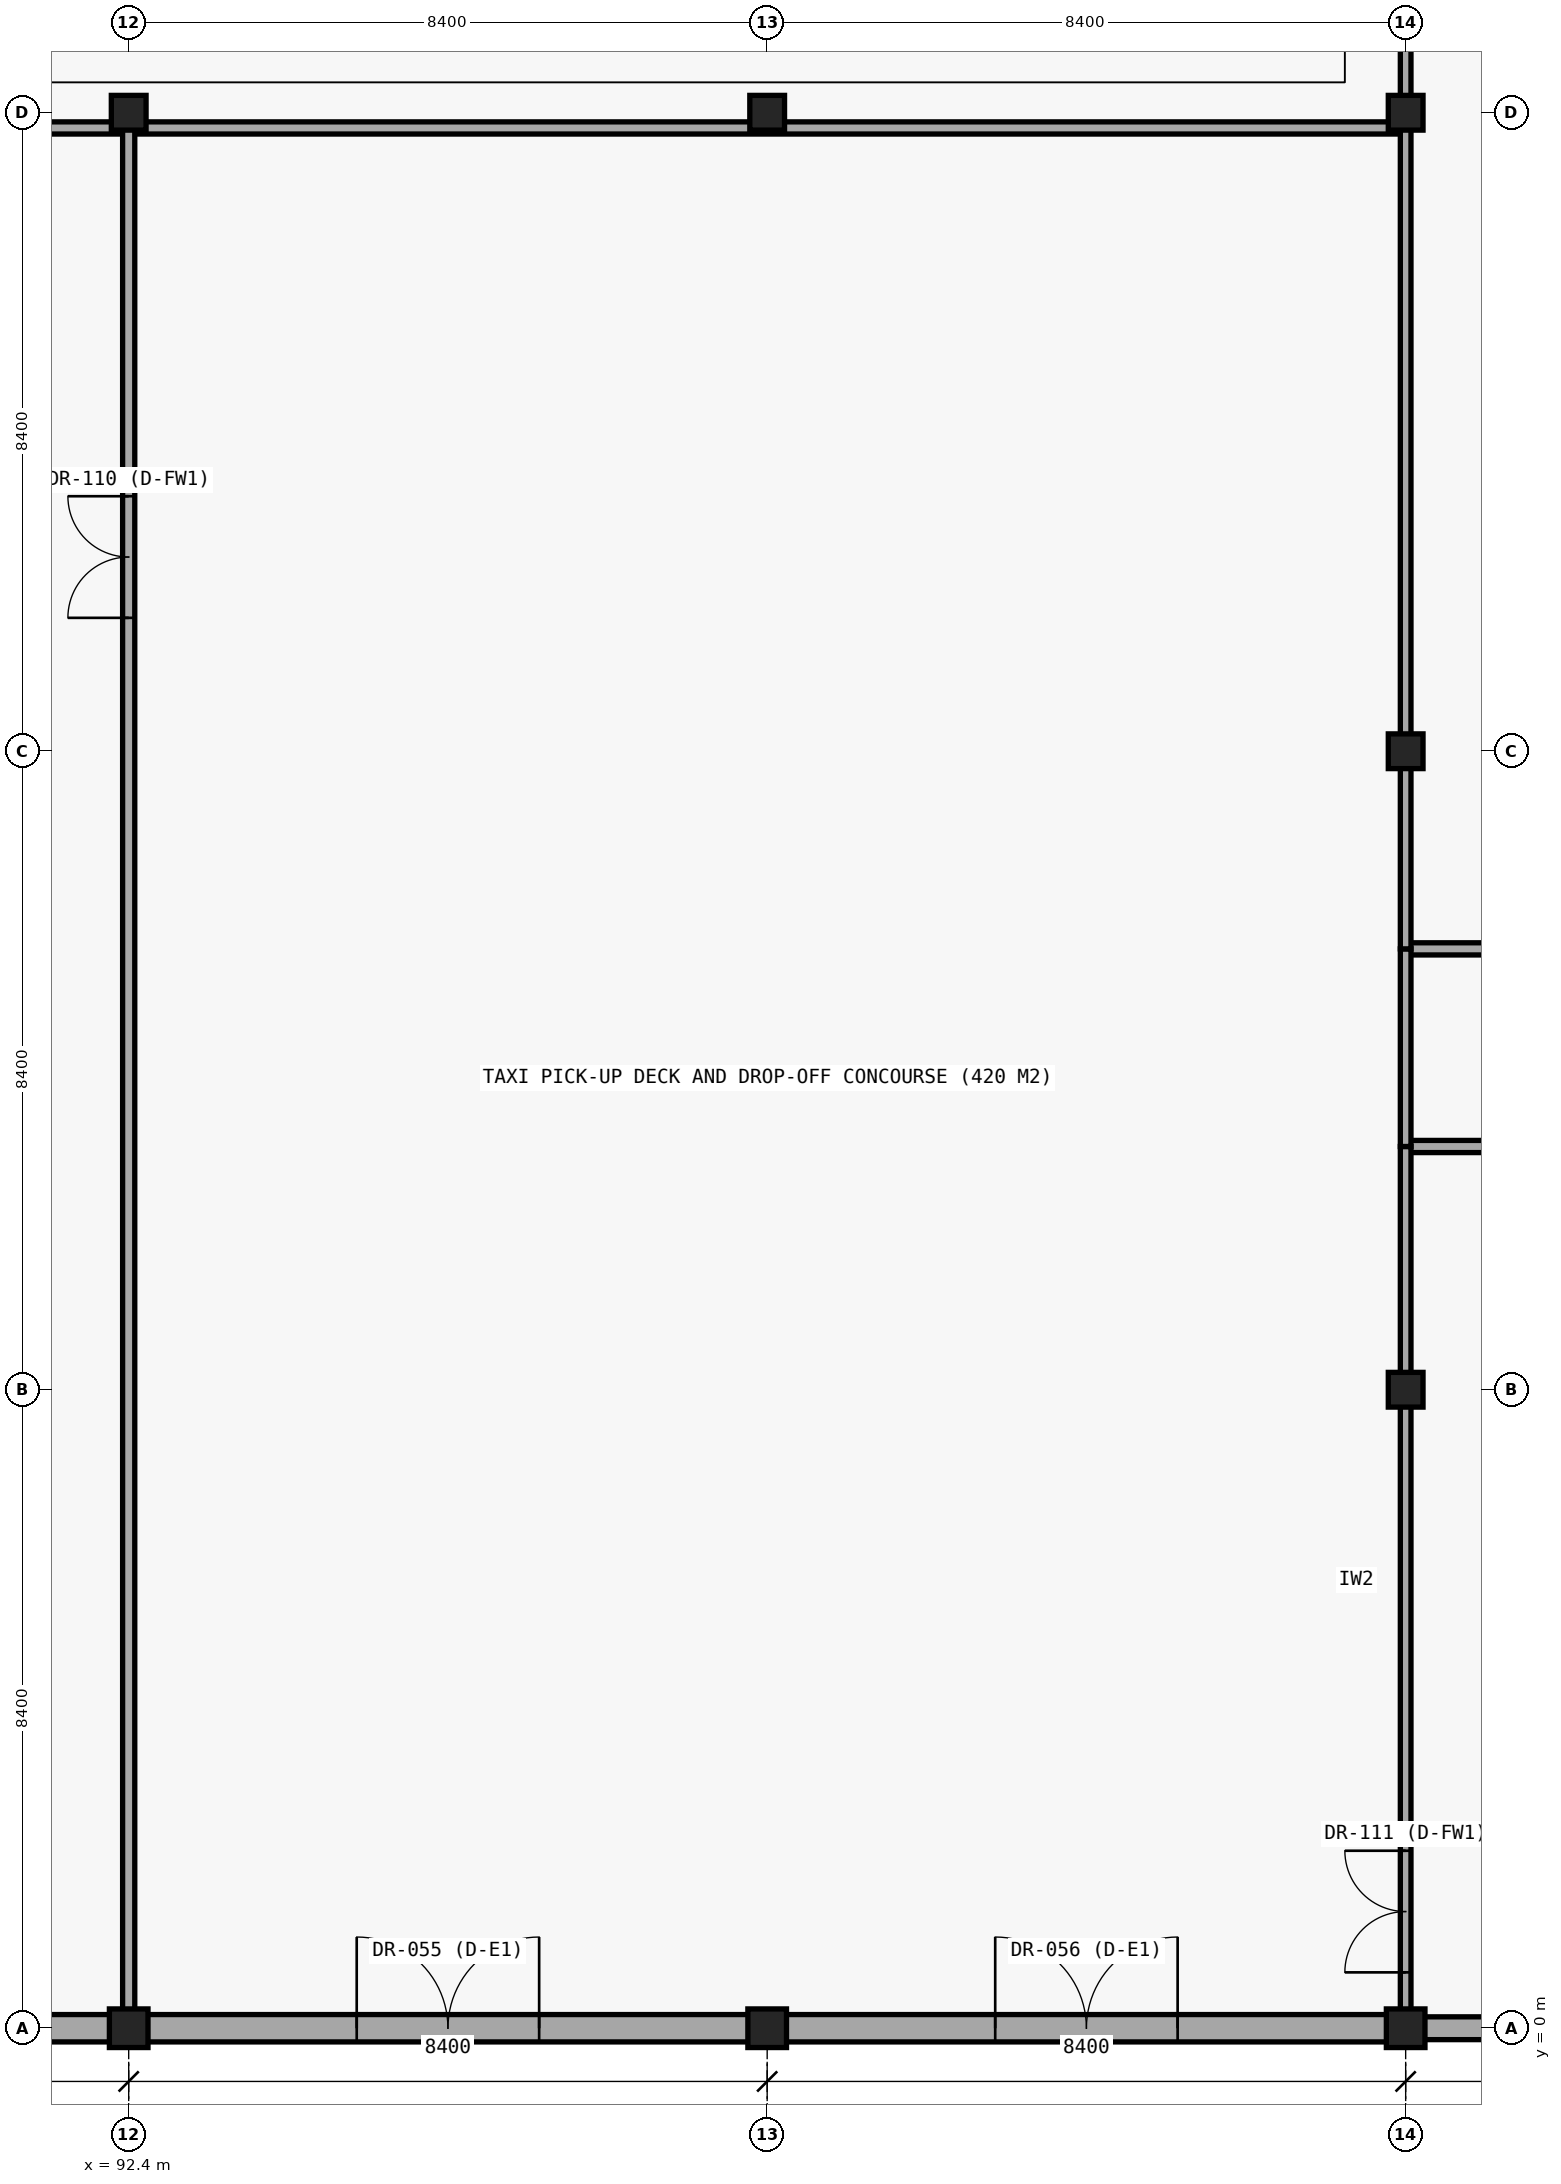
"""IFC4 building model, lengths in metres.
Left out: names, types, materials, properties, quantities, classifications, styles, units other than length and angle.
Written with IfcOpenShell. Run it as: python <this file> out.ifc"""

import sys

from ifc_helpers import new_model, si_unit, direction, frame, frame_2d, origin, origin_2d, place, context, subcontext, project, spatial, rectangle, hollow_circle, extrude, element, fill, save


model = new_model("IFC4")
c1 = context("Model", 3, precision=1e-05, world=origin(), true_north=direction((0.0, 1.0)))
c2 = subcontext(c1, "Body", "Model", "MODEL_VIEW")
j1 = project(units=[si_unit("LENGTHUNIT", "METRE"), si_unit("PLANEANGLEUNIT", "RADIAN")], contexts=[c1])
p1 = place(None, origin())
s1 = spatial("IfcSite", under=j1, at=p1, CompositionType="ELEMENT")
p2 = place(p1, origin())
s2 = spatial("IfcBuilding", under=s1, at=p2, CompositionType="ELEMENT")
p3 = place(p2, origin())
s3 = spatial("IfcBuildingStorey", under=s2, at=p3, CompositionType="ELEMENT", Elevation=0.0)
p4 = place(p3, frame((92.4, 0.0, 0.0), z_axis=(0.0, 0.0, 1.0), x_axis=(1.0, 0.0, 0.0)))
e1 = element("IfcColumn", 1, at=p4, inside=s3, PredefinedType="COLUMN", context=c2, shape_type="SweptSolid", body=[
    extrude(hollow_circle(Radius=0.254, WallThickness=0.016, at=origin_2d()), origin(), (0.0, 0.0, 1.0), 4.8),
])
p5 = place(p3, frame((92.4, 25.2, 0.0), z_axis=(0.0, 0.0, 1.0), x_axis=(1.0, 0.0, 0.0)))
e2 = element("IfcColumn", 2, at=p5, inside=s3, PredefinedType="COLUMN", context=c2, shape_type="SweptSolid", body=[
    extrude(hollow_circle(Radius=0.229, WallThickness=0.014, at=origin_2d()), origin(), (0.0, 0.0, 1.0), 4.62),
])
p6 = place(p3, frame((100.8, 0.0, 0.0), z_axis=(0.0, 0.0, 1.0), x_axis=(1.0, 0.0, 0.0)))
e3 = element("IfcColumn", 3, at=p6, inside=s3, PredefinedType="COLUMN", context=c2, shape_type="SweptSolid", body=[
    extrude(hollow_circle(Radius=0.254, WallThickness=0.016, at=origin_2d()), origin(), (0.0, 0.0, 1.0), 4.8),
])
p7 = place(p3, frame((100.8, 25.2, 0.0), z_axis=(0.0, 0.0, 1.0), x_axis=(1.0, 0.0, 0.0)))
e4 = element("IfcColumn", 4, at=p7, inside=s3, PredefinedType="COLUMN", context=c2, shape_type="SweptSolid", body=[
    extrude(hollow_circle(Radius=0.229, WallThickness=0.014, at=origin_2d()), origin(), (0.0, 0.0, 1.0), 4.62),
])
p8 = place(p3, frame((109.2, 0.0, 0.0), z_axis=(0.0, 0.0, 1.0), x_axis=(1.0, 0.0, 0.0)))
e5 = element("IfcColumn", 5, at=p8, inside=s3, PredefinedType="COLUMN", context=c2, shape_type="SweptSolid", body=[
    extrude(hollow_circle(Radius=0.254, WallThickness=0.016, at=origin_2d()), origin(), (0.0, 0.0, 1.0), 4.8),
])
for number, where, z_axis, x_axis in (
    (6, (109.2, 8.4, 0.0), (0.0, 0.0, 1.0), (1.0, 0.0, 0.0)),
    (7, (109.2, 16.8, 0.0), (0.0, 0.0, 1.0), (1.0, 0.0, 0.0)),
    (8, (109.2, 25.2, 0.0), (0.0, 0.0, 1.0), (1.0, 0.0, 0.0)),
):
    element("IfcColumn", number, at=place(p3, frame(where, z_axis=z_axis, x_axis=x_axis)), inside=s3, PredefinedType="COLUMN", context=c2, shape_type="SweptSolid", body=[
        extrude(hollow_circle(Radius=0.229, WallThickness=0.014, at=origin_2d()), origin(), (0.0, 0.0, 1.0), 4.8),
    ])
p9 = place(p3, frame((84.0, 0.0, 0.0), z_axis=(0.0, 0.0, 1.0), x_axis=(1.0, 0.0, 0.0)))
e9 = element("IfcWall", 9, at=p9, inside=s3, PredefinedType="STANDARD", context=c2, shape_type="SweptSolid", body=[
    extrude(rectangle(XDim=8.4, YDim=0.36, at=frame_2d((4.2, 0.0))), origin(), (0.0, 0.0, 1.0), 4.3),
])
p10 = place(p9, frame((1.6, 0.0, 0.0)))
e10 = element("IfcOpeningElement", 10, at=p10, cuts=e9, PredefinedType="OPENING", context=c2, shape_type="SweptSolid", body=[
    extrude(rectangle(XDim=5.2, YDim=4.1, at=frame_2d((2.6, 2.05))), frame((0.0, 0.19, 0.0), z_axis=(0.0, -1.0, 0.0), x_axis=(1.0, 0.0, 0.0)), (0.0, 0.0, 1.0), 0.38),
])
p11 = place(p3, frame((92.4, 0.0, 0.0), z_axis=(0.0, 0.0, 1.0), x_axis=(1.0, 0.0, 0.0)))
e11 = element("IfcWall", 11, at=p11, inside=s3, PredefinedType="STANDARD", context=c2, shape_type="SweptSolid", body=[
    extrude(rectangle(XDim=8.4, YDim=0.36, at=frame_2d((4.2, 0.0))), origin(), (0.0, 0.0, 1.0), 4.2),
])
p12 = place(p11, frame((3.0, 0.0, 0.0)))
e12 = element("IfcOpeningElement", 12, at=p12, cuts=e11, PredefinedType="OPENING", context=c2, shape_type="SweptSolid", body=[
    extrude(rectangle(XDim=2.4, YDim=2.6, at=frame_2d((1.2, 1.3))), frame((0.0, 0.19, 0.0), z_axis=(0.0, -1.0, 0.0), x_axis=(1.0, 0.0, 0.0)), (0.0, 0.0, 1.0), 0.38),
])
p13 = place(p3, frame((100.8, 0.0, 0.0), z_axis=(0.0, 0.0, 1.0), x_axis=(1.0, 0.0, 0.0)))
e13 = element("IfcWall", 13, at=p13, inside=s3, PredefinedType="STANDARD", context=c2, shape_type="SweptSolid", body=[
    extrude(rectangle(XDim=8.4, YDim=0.36, at=frame_2d((4.2, 0.0))), origin(), (0.0, 0.0, 1.0), 4.2),
])
p14 = place(p13, frame((3.0, 0.0, 0.0)))
e14 = element("IfcOpeningElement", 14, at=p14, cuts=e13, PredefinedType="OPENING", context=c2, shape_type="SweptSolid", body=[
    extrude(rectangle(XDim=2.4, YDim=2.6, at=frame_2d((1.2, 1.3))), frame((0.0, 0.19, 0.0), z_axis=(0.0, -1.0, 0.0), x_axis=(1.0, 0.0, 0.0)), (0.0, 0.0, 1.0), 0.38),
])
p15 = place(p3, frame((109.2, 0.0, 0.0), z_axis=(0.0, 0.0, 1.0), x_axis=(1.0, 0.0, 0.0)))
e15 = element("IfcWall", 15, at=p15, inside=s3, PredefinedType="STANDARD", context=c2, shape_type="SweptSolid", body=[
    extrude(rectangle(XDim=8.4, YDim=0.3, at=frame_2d((4.2, 0.0))), origin(), (0.0, 0.0, 1.0), 4.18),
])
p16 = place(p15, frame((1.8, 0.0, 1.05)))
e16 = element("IfcOpeningElement", 16, at=p16, cuts=e15, PredefinedType="OPENING", context=c2, shape_type="SweptSolid", body=[
    extrude(rectangle(XDim=2.3, YDim=1.9, at=frame_2d((1.15, 0.95))), frame((0.0, 0.16, 0.0), z_axis=(0.0, -1.0, 0.0), x_axis=(1.0, 0.0, 0.0)), (0.0, 0.0, 1.0), 0.32),
])
p17 = place(p15, frame((5.0, 0.0, 1.15)))
e17 = element("IfcOpeningElement", 17, at=p17, cuts=e15, PredefinedType="OPENING", context=c2, shape_type="SweptSolid", body=[
    extrude(rectangle(XDim=1.5, YDim=1.7, at=frame_2d((0.75, 0.85))), frame((0.0, 0.16, 0.0), z_axis=(0.0, -1.0, 0.0), x_axis=(1.0, 0.0, 0.0)), (0.0, 0.0, 1.0), 0.32),
])
p18 = place(p3, frame((109.2, 11.6, 0.0), z_axis=(0.0, 0.0, 1.0), x_axis=(1.0, 0.0, 0.0)))
e18 = element("IfcWall", 18, at=p18, inside=s3, PredefinedType="PARTITIONING", context=c2, shape_type="SweptSolid", body=[
    extrude(rectangle(XDim=16.8, YDim=0.16, at=frame_2d((8.4, 0.0))), origin(), (0.0, 0.0, 1.0), 4.1),
])
p19 = place(p3, frame((109.2, 14.2, 0.0), z_axis=(0.0, 0.0, 1.0), x_axis=(1.0, 0.0, 0.0)))
e19 = element("IfcWall", 19, at=p19, inside=s3, PredefinedType="PARTITIONING", context=c2, shape_type="SweptSolid", body=[
    extrude(rectangle(XDim=14.2, YDim=0.16, at=frame_2d((7.1, 0.0))), origin(), (0.0, 0.0, 1.0), 4.1),
])
p20 = place(p19, frame((6.4, 0.0, 0.0)))
e20 = element("IfcOpeningElement", 20, at=p20, cuts=e19, PredefinedType="OPENING", context=c2, shape_type="SweptSolid", body=[
    extrude(rectangle(XDim=1.4, YDim=2.25, at=frame_2d((0.7, 1.125))), frame((0.0, 0.09, 0.0), z_axis=(0.0, -1.0, 0.0), x_axis=(1.0, 0.0, 0.0)), (0.0, 0.0, 1.0), 0.18),
])
p21 = place(p3, frame((59.0, 25.0, 0.0), z_axis=(0.0, 0.0, 1.0), x_axis=(1.0, 0.0, 0.0)))
e21 = element("IfcWall", 21, at=p21, inside=s3, PredefinedType="PARTITIONING", context=c2, shape_type="SweptSolid", body=[
    extrude(rectangle(XDim=33.4, YDim=0.16, at=frame_2d((16.7, 0.0))), origin(), (0.0, 0.0, 1.0), 4.1),
])
p22 = place(p21, frame((12.42, 0.0, 0.0)))
e22 = element("IfcOpeningElement", 22, at=p22, cuts=e21, PredefinedType="OPENING", context=c2, shape_type="SweptSolid", body=[
    extrude(rectangle(XDim=1.4, YDim=2.25, at=frame_2d((0.7, 1.125))), frame((0.0, 0.09, 0.0), z_axis=(0.0, -1.0, 0.0), x_axis=(1.0, 0.0, 0.0)), (0.0, 0.0, 1.0), 0.18),
])
p23 = place(p3, frame((92.4, 25.0, 0.0), z_axis=(0.0, 0.0, 1.0), x_axis=(1.0, 0.0, 0.0)))
e23 = element("IfcWall", 23, at=p23, inside=s3, PredefinedType="PARTITIONING", context=c2, shape_type="SweptSolid", body=[
    extrude(rectangle(XDim=16.8, YDim=0.16, at=frame_2d((8.4, 0.0))), origin(), (0.0, 0.0, 1.0), 4.1),
])
p24 = place(p3, frame((92.4, 0.185, 0.0), z_axis=(0.0, 0.0, 1.0), x_axis=(0.0, 1.0, 0.0)))
e24 = element("IfcWall", 24, at=p24, inside=s3, PredefinedType="PARTITIONING", context=c2, shape_type="SweptSolid", body=[
    extrude(rectangle(XDim=24.815, YDim=0.16, at=frame_2d((12.407, 0.0))), origin(), (0.0, 0.0, 1.0), 4.1),
])
p25 = place(p24, frame((18.37, 0.0, 0.0)))
e25 = element("IfcOpeningElement", 25, at=p25, cuts=e24, PredefinedType="OPENING", context=c2, shape_type="SweptSolid", body=[
    extrude(rectangle(XDim=1.6, YDim=2.25, at=frame_2d((0.8, 1.125))), frame((0.0, 0.09, 0.0), z_axis=(0.0, -1.0, 0.0), x_axis=(1.0, 0.0, 0.0)), (0.0, 0.0, 1.0), 0.18),
])
p26 = place(p3, frame((109.2, 0.185, 0.0), z_axis=(0.0, 0.0, 1.0), x_axis=(0.0, 1.0, 0.0)))
e26 = element("IfcWall", 26, at=p26, inside=s3, PredefinedType="PARTITIONING", context=c2, shape_type="SweptSolid", body=[
    extrude(rectangle(XDim=11.415, YDim=0.14, at=frame_2d((5.708, 0.0))), origin(), (0.0, 0.0, 1.0), 4.1),
])
p27 = place(p26, frame((0.55, 0.0, 0.0)))
e27 = element("IfcOpeningElement", 27, at=p27, cuts=e26, PredefinedType="OPENING", context=c2, shape_type="SweptSolid", body=[
    extrude(rectangle(XDim=1.6, YDim=2.25, at=frame_2d((0.8, 1.125))), frame((0.0, 0.08, 0.0), z_axis=(0.0, -1.0, 0.0), x_axis=(1.0, 0.0, 0.0)), (0.0, 0.0, 1.0), 0.16),
])
p28 = place(p3, frame((109.2, 11.6, 0.0), z_axis=(0.0, 0.0, 1.0), x_axis=(0.0, 1.0, 0.0)))
e28 = element("IfcWall", 28, at=p28, inside=s3, PredefinedType="PARTITIONING", context=c2, shape_type="SweptSolid", body=[
    extrude(rectangle(XDim=2.6, YDim=0.14, at=frame_2d((1.3, 0.0))), origin(), (0.0, 0.0, 1.0), 4.1),
])
p29 = place(p3, frame((109.2, 14.2, 0.0), z_axis=(0.0, 0.0, 1.0), x_axis=(0.0, 1.0, 0.0)))
e29 = element("IfcWall", 29, at=p29, inside=s3, PredefinedType="PARTITIONING", context=c2, shape_type="SweptSolid", body=[
    extrude(rectangle(XDim=10.8, YDim=0.14, at=frame_2d((5.4, 0.0))), origin(), (0.0, 0.0, 1.0), 4.1),
])
p30 = place(p3, frame((109.2, 25.05, 0.0), z_axis=(0.0, 0.0, 1.0), x_axis=(0.0, 1.0, 0.0)))
e30 = element("IfcWall", 30, at=p30, inside=s3, PredefinedType="PARTITIONING", context=c2, shape_type="SweptSolid", body=[
    extrude(rectangle(XDim=8.505, YDim=0.14, at=frame_2d((4.252, 0.0))), origin(), (0.0, 0.0, 1.0), 4.1),
])
p31 = place(p12, origin())
e31 = element("IfcDoor", 31, at=p31, inside=s3, OperationType="DOUBLE_DOOR_SINGLE_SWING", PredefinedType="DOOR", context=c2, shape_type="SweptSolid", body=[
    extrude(rectangle(XDim=2.4, YDim=2.6, at=frame_2d((1.2, 1.3))), frame((0.0, 0.025, 0.0), z_axis=(0.0, -1.0, 0.0), x_axis=(1.0, 0.0, 0.0)), (0.0, 0.0, 1.0), 0.05),
])
fill(e12, e31)
p32 = place(p14, origin())
e32 = element("IfcDoor", 32, at=p32, inside=s3, OperationType="DOUBLE_DOOR_SINGLE_SWING", PredefinedType="DOOR", context=c2, shape_type="SweptSolid", body=[
    extrude(rectangle(XDim=2.4, YDim=2.6, at=frame_2d((1.2, 1.3))), frame((0.0, 0.025, 0.0), z_axis=(0.0, -1.0, 0.0), x_axis=(1.0, 0.0, 0.0)), (0.0, 0.0, 1.0), 0.05),
])
fill(e14, e32)
p33 = place(p25, origin())
e33 = element("IfcDoor", 33, at=p33, inside=s3, OperationType="DOUBLE_DOOR_SINGLE_SWING", PredefinedType="DOOR", context=c2, shape_type="SweptSolid", body=[
    extrude(rectangle(XDim=1.6, YDim=2.25, at=frame_2d((0.8, 1.125))), frame((0.0, 0.025, 0.0), z_axis=(0.0, -1.0, 0.0), x_axis=(1.0, 0.0, 0.0)), (0.0, 0.0, 1.0), 0.05),
])
fill(e25, e33)
p34 = place(p27, origin())
e34 = element("IfcDoor", 34, at=p34, inside=s3, OperationType="DOUBLE_DOOR_SINGLE_SWING", PredefinedType="DOOR", context=c2, shape_type="SweptSolid", body=[
    extrude(rectangle(XDim=1.6, YDim=2.25, at=frame_2d((0.8, 1.125))), frame((0.0, 0.025, 0.0), z_axis=(0.0, -1.0, 0.0), x_axis=(1.0, 0.0, 0.0)), (0.0, 0.0, 1.0), 0.05),
])
fill(e27, e34)
save(model, sys.argv[1])
